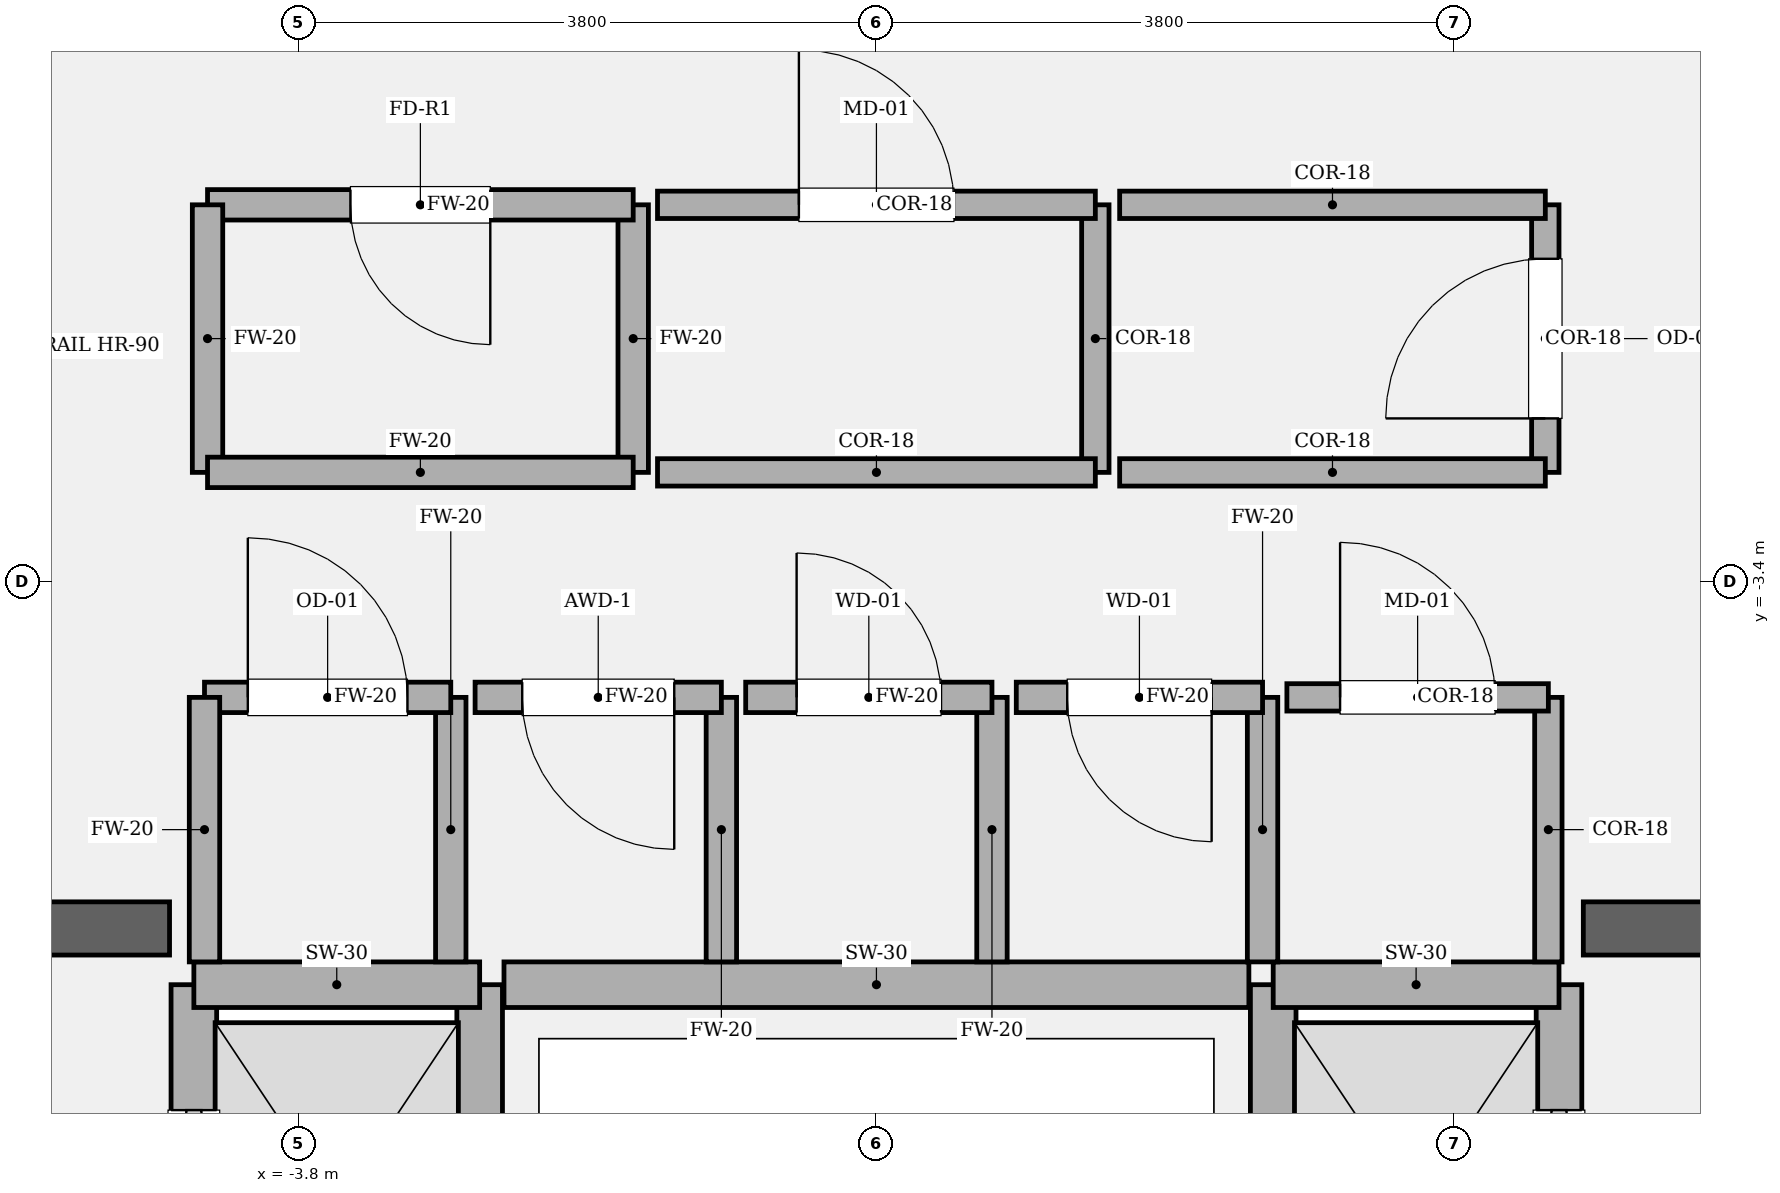
"""IFC4 building model, lengths in metres.
Left out: names, types, materials, properties, quantities, classifications, styles, units other than length and angle.
Written with IfcOpenShell. Run it as: python <this file> out.ifc"""

import sys

from ifc_helpers import new_model, si_unit, direction, frame, frame_2d, origin, place, context, subcontext, project, spatial, rectangle, extrude, element, fill, save


model = new_model("IFC4")
c1 = context("Model", 3, precision=1e-05, world=origin(), true_north=direction((0.0, 1.0)))
c2 = subcontext(c1, "Body", "Model", "MODEL_VIEW")
j1 = project(units=[si_unit("LENGTHUNIT", "METRE"), si_unit("PLANEANGLEUNIT", "RADIAN")], contexts=[c1])
p1 = place(None, origin())
s1 = spatial("IfcSite", under=j1, at=p1, CompositionType="ELEMENT")
p2 = place(p1, origin())
s2 = spatial("IfcBuilding", under=s1, at=p2, CompositionType="ELEMENT")
p3 = place(p2, frame((0.0, 0.0, 321.6)))
s3 = spatial("IfcBuildingStorey", under=s2, at=p3, CompositionType="ELEMENT", Elevation=321.6)
p4 = place(p3, frame((-9.975, -5.68, 0.0), z_axis=(0.0, 0.0, 1.0), x_axis=(1.0, 0.0, 0.0)))
e1 = element("IfcWall", 1, at=p4, inside=s3, PredefinedType="SOLIDWALL", context=c2, shape_type="SweptSolid", body=[
    extrude(rectangle(XDim=5.325, YDim=0.35, at=frame_2d((2.663, 0.0))), origin(), (0.0, 0.0, 1.0), 4.2),
])
p5 = place(p4, frame((1.435, 0.0, 0.0)))
e2 = element("IfcOpeningElement", 2, at=p5, cuts=e1, PredefinedType="OPENING", context=c2, shape_type="SweptSolid", body=[
    extrude(rectangle(XDim=1.18, YDim=2.2, at=frame_2d((0.59, 1.1))), frame((0.0, 0.185, 0.0), z_axis=(0.0, -1.0, 0.0), x_axis=(1.0, 0.0, 0.0)), (0.0, 0.0, 1.0), 0.37),
])
p6 = place(p3, frame((4.65, -5.68, 0.0), z_axis=(0.0, 0.0, 1.0), x_axis=(1.0, 0.0, 0.0)))
e3 = element("IfcWall", 3, at=p6, inside=s3, PredefinedType="SOLIDWALL", context=c2, shape_type="SweptSolid", body=[
    extrude(rectangle(XDim=5.325, YDim=0.35, at=frame_2d((2.663, 0.0))), origin(), (0.0, 0.0, 1.0), 4.2),
])
p7 = place(p6, frame((2.71, 0.0, 0.0)))
e4 = element("IfcOpeningElement", 4, at=p7, cuts=e3, PredefinedType="OPENING", context=c2, shape_type="SweptSolid", body=[
    extrude(rectangle(XDim=1.18, YDim=2.2, at=frame_2d((0.59, 1.1))), frame((0.0, 0.185, 0.0), z_axis=(0.0, -1.0, 0.0), x_axis=(1.0, 0.0, 0.0)), (0.0, 0.0, 1.0), 0.37),
])
p8 = place(p3, frame((-4.49, -8.82, 0.0), z_axis=(0.0, 0.0, 1.0), x_axis=(0.0, 1.0, 0.0)))
e5 = element("IfcWall", 5, at=p8, inside=s3, PredefinedType="SOLIDWALL", context=c2, shape_type="SweptSolid", body=[
    extrude(rectangle(XDim=2.77, YDim=0.3, at=frame_2d((1.385, 0.0))), origin(), (0.0, 0.0, 1.0), 4.0),
])
p9 = place(p8, frame((0.825, 0.0, 0.0)))
e6 = element("IfcOpeningElement", 6, at=p9, cuts=e5, PredefinedType="OPENING", context=c2, shape_type="SweptSolid", body=[
    extrude(rectangle(XDim=1.12, YDim=2.25, at=frame_2d((0.56, 1.125))), frame((0.0, 0.16, 0.0), z_axis=(0.0, -1.0, 0.0), x_axis=(1.0, 0.0, 0.0)), (0.0, 0.0, 1.0), 0.32),
])
p10 = place(p3, frame((-2.61, -8.82, 0.0), z_axis=(0.0, 0.0, 1.0), x_axis=(0.0, 1.0, 0.0)))
e7 = element("IfcWall", 7, at=p10, inside=s3, PredefinedType="SOLIDWALL", context=c2, shape_type="SweptSolid", body=[
    extrude(rectangle(XDim=2.77, YDim=0.3, at=frame_2d((1.385, 0.0))), origin(), (0.0, 0.0, 1.0), 4.0),
])
p11 = place(p3, frame((-4.49, -6.05, 0.0), z_axis=(0.0, 0.0, 1.0), x_axis=(1.0, 0.0, 0.0)))
e8 = element("IfcWall", 8, at=p11, inside=s3, PredefinedType="SOLIDWALL", context=c2, shape_type="SweptSolid", body=[
    extrude(rectangle(XDim=1.88, YDim=0.3, at=frame_2d((0.94, 0.0))), origin(), (0.0, 0.0, 1.0), 4.0),
])
p12 = place(p3, frame((4.49, -8.82, 0.0), z_axis=(0.0, 0.0, 1.0), x_axis=(0.0, 1.0, 0.0)))
e9 = element("IfcWall", 9, at=p12, inside=s3, PredefinedType="SOLIDWALL", context=c2, shape_type="SweptSolid", body=[
    extrude(rectangle(XDim=2.77, YDim=0.3, at=frame_2d((1.385, 0.0))), origin(), (0.0, 0.0, 1.0), 4.0),
])
p13 = place(p12, frame((0.825, 0.0, 0.0)))
e10 = element("IfcOpeningElement", 10, at=p13, cuts=e9, PredefinedType="OPENING", context=c2, shape_type="SweptSolid", body=[
    extrude(rectangle(XDim=1.12, YDim=2.25, at=frame_2d((0.56, 1.125))), frame((0.0, 0.16, 0.0), z_axis=(0.0, -1.0, 0.0), x_axis=(1.0, 0.0, 0.0)), (0.0, 0.0, 1.0), 0.32),
])
p14 = place(p3, frame((2.61, -8.82, 0.0), z_axis=(0.0, 0.0, 1.0), x_axis=(0.0, 1.0, 0.0)))
e11 = element("IfcWall", 11, at=p14, inside=s3, PredefinedType="SOLIDWALL", context=c2, shape_type="SweptSolid", body=[
    extrude(rectangle(XDim=2.77, YDim=0.3, at=frame_2d((1.385, 0.0))), origin(), (0.0, 0.0, 1.0), 4.0),
])
p15 = place(p3, frame((2.61, -6.05, 0.0), z_axis=(0.0, 0.0, 1.0), x_axis=(1.0, 0.0, 0.0)))
e12 = element("IfcWall", 12, at=p15, inside=s3, PredefinedType="SOLIDWALL", context=c2, shape_type="SweptSolid", body=[
    extrude(rectangle(XDim=1.88, YDim=0.3, at=frame_2d((0.94, 0.0))), origin(), (0.0, 0.0, 1.0), 4.0),
])
p16 = place(p3, frame((-2.45, -6.05, 0.0), z_axis=(0.0, 0.0, 1.0), x_axis=(1.0, 0.0, 0.0)))
e13 = element("IfcWall", 13, at=p16, inside=s3, PredefinedType="SOLIDWALL", context=c2, shape_type="SweptSolid", body=[
    extrude(rectangle(XDim=4.9, YDim=0.3, at=frame_2d((2.45, 0.0))), origin(), (0.0, 0.0, 1.0), 4.0),
])
p17 = place(p3, frame((-2.8, -5.9, 0.0), z_axis=(0.0, 0.0, 1.0), x_axis=(0.0, 1.0, 0.0)))
e14 = element("IfcWall", 14, at=p17, inside=s3, PredefinedType="SOLIDWALL", context=c2, shape_type="SweptSolid", body=[
    extrude(rectangle(XDim=1.74, YDim=0.2, at=frame_2d((0.87, 0.0))), origin(), (0.0, 0.0, 1.0), 4.0),
])
p18 = place(p3, frame((-2.8, -4.16, 0.0), z_axis=(0.0, 0.0, 1.0), x_axis=(-1.0, 0.0, 0.0)))
e15 = element("IfcWall", 15, at=p18, inside=s3, PredefinedType="SOLIDWALL", context=c2, shape_type="SweptSolid", body=[
    extrude(rectangle(XDim=1.62, YDim=0.2, at=frame_2d((0.81, 0.0))), origin(), (0.0, 0.0, 1.0), 4.0),
])
p19 = place(p18, frame((0.285, 0.0, 0.0)))
e16 = element("IfcOpeningElement", 16, at=p19, cuts=e15, PredefinedType="OPENING", context=c2, shape_type="SweptSolid", body=[
    extrude(rectangle(XDim=1.05, YDim=2.2, at=frame_2d((0.525, 1.1))), frame((0.0, 0.11, 0.0), z_axis=(0.0, -1.0, 0.0), x_axis=(1.0, 0.0, 0.0)), (0.0, 0.0, 1.0), 0.22),
])
for number, where, z_axis, x_axis in (
    (17, (-4.42, -4.16, 0.0), (0.0, 0.0, 1.0), (0.0, -1.0, 0.0)),
    (18, (-1.02, -5.9, 0.0), (0.0, 0.0, 1.0), (0.0, 1.0, 0.0)),
):
    element("IfcWall", number, at=place(p3, frame(where, z_axis=z_axis, x_axis=x_axis)), inside=s3, PredefinedType="SOLIDWALL", context=c2, shape_type="SweptSolid", body=[
        extrude(rectangle(XDim=1.74, YDim=0.2, at=frame_2d((0.87, 0.0))), origin(), (0.0, 0.0, 1.0), 4.0),
    ])
p20 = place(p3, frame((-1.02, -4.16, 0.0), z_axis=(0.0, 0.0, 1.0), x_axis=(-1.0, 0.0, 0.0)))
e19 = element("IfcWall", 19, at=p20, inside=s3, PredefinedType="SOLIDWALL", context=c2, shape_type="SweptSolid", body=[
    extrude(rectangle(XDim=1.62, YDim=0.2, at=frame_2d((0.81, 0.0))), origin(), (0.0, 0.0, 1.0), 4.0),
])
p21 = place(p20, frame((0.31, 0.0, 0.0)))
e20 = element("IfcOpeningElement", 20, at=p21, cuts=e19, PredefinedType="OPENING", context=c2, shape_type="SweptSolid", body=[
    extrude(rectangle(XDim=1.0, YDim=2.15, at=frame_2d((0.5, 1.075))), frame((0.0, 0.11, 0.0), z_axis=(0.0, -1.0, 0.0), x_axis=(1.0, 0.0, 0.0)), (0.0, 0.0, 1.0), 0.22),
])
p22 = place(p3, frame((0.76, -5.9, 0.0), z_axis=(0.0, 0.0, 1.0), x_axis=(0.0, 1.0, 0.0)))
e21 = element("IfcWall", 21, at=p22, inside=s3, PredefinedType="SOLIDWALL", context=c2, shape_type="SweptSolid", body=[
    extrude(rectangle(XDim=1.74, YDim=0.2, at=frame_2d((0.87, 0.0))), origin(), (0.0, 0.0, 1.0), 4.0),
])
p23 = place(p3, frame((0.76, -4.16, 0.0), z_axis=(0.0, 0.0, 1.0), x_axis=(-1.0, 0.0, 0.0)))
e22 = element("IfcWall", 22, at=p23, inside=s3, PredefinedType="SOLIDWALL", context=c2, shape_type="SweptSolid", body=[
    extrude(rectangle(XDim=1.62, YDim=0.2, at=frame_2d((0.81, 0.0))), origin(), (0.0, 0.0, 1.0), 4.0),
])
p24 = place(p23, frame((0.335, 0.0, 0.0)))
e23 = element("IfcOpeningElement", 23, at=p24, cuts=e22, PredefinedType="OPENING", context=c2, shape_type="SweptSolid", body=[
    extrude(rectangle(XDim=0.95, YDim=2.15, at=frame_2d((0.475, 1.075))), frame((0.0, 0.11, 0.0), z_axis=(0.0, -1.0, 0.0), x_axis=(1.0, 0.0, 0.0)), (0.0, 0.0, 1.0), 0.22),
])
p25 = place(p3, frame((2.54, -5.9, 0.0), z_axis=(0.0, 0.0, 1.0), x_axis=(0.0, 1.0, 0.0)))
e24 = element("IfcWall", 24, at=p25, inside=s3, PredefinedType="SOLIDWALL", context=c2, shape_type="SweptSolid", body=[
    extrude(rectangle(XDim=1.74, YDim=0.2, at=frame_2d((0.87, 0.0))), origin(), (0.0, 0.0, 1.0), 4.0),
])
p26 = place(p3, frame((2.54, -4.16, 0.0), z_axis=(0.0, 0.0, 1.0), x_axis=(-1.0, 0.0, 0.0)))
e25 = element("IfcWall", 25, at=p26, inside=s3, PredefinedType="SOLIDWALL", context=c2, shape_type="SweptSolid", body=[
    extrude(rectangle(XDim=1.62, YDim=0.2, at=frame_2d((0.81, 0.0))), origin(), (0.0, 0.0, 1.0), 4.0),
])
p27 = place(p26, frame((0.335, 0.0, 0.0)))
e26 = element("IfcOpeningElement", 26, at=p27, cuts=e25, PredefinedType="OPENING", context=c2, shape_type="SweptSolid", body=[
    extrude(rectangle(XDim=0.95, YDim=2.15, at=frame_2d((0.475, 1.075))), frame((0.0, 0.11, 0.0), z_axis=(0.0, -1.0, 0.0), x_axis=(1.0, 0.0, 0.0)), (0.0, 0.0, 1.0), 0.22),
])
p28 = place(p3, frame((4.42, -5.9, 0.0), z_axis=(0.0, 0.0, 1.0), x_axis=(0.0, 1.0, 0.0)))
e27 = element("IfcWall", 27, at=p28, inside=s3, PredefinedType="PARTITIONING", context=c2, shape_type="SweptSolid", body=[
    extrude(rectangle(XDim=1.74, YDim=0.18, at=frame_2d((0.87, 0.0))), origin(), (0.0, 0.0, 1.0), 4.0),
])
p29 = place(p3, frame((4.42, -4.16, 0.0), z_axis=(0.0, 0.0, 1.0), x_axis=(-1.0, 0.0, 0.0)))
e28 = element("IfcWall", 28, at=p29, inside=s3, PredefinedType="PARTITIONING", context=c2, shape_type="SweptSolid", body=[
    extrude(rectangle(XDim=1.72, YDim=0.18, at=frame_2d((0.86, 0.0))), origin(), (0.0, 0.0, 1.0), 4.0),
])
p30 = place(p29, frame((0.35, 0.0, 0.0)))
e29 = element("IfcOpeningElement", 29, at=p30, cuts=e28, PredefinedType="OPENING", context=c2, shape_type="SweptSolid", body=[
    extrude(rectangle(XDim=1.02, YDim=2.2, at=frame_2d((0.51, 1.1))), frame((0.0, 0.1, 0.0), z_axis=(0.0, -1.0, 0.0), x_axis=(1.0, 0.0, 0.0)), (0.0, 0.0, 1.0), 0.2),
])
p31 = place(p3, frame((-1.6, -2.68, 0.0), z_axis=(0.0, 0.0, 1.0), x_axis=(0.0, 1.0, 0.0)))
e30 = element("IfcWall", 30, at=p31, inside=s3, PredefinedType="SOLIDWALL", context=c2, shape_type="SweptSolid", body=[
    extrude(rectangle(XDim=1.76, YDim=0.2, at=frame_2d((0.88, 0.0))), origin(), (0.0, 0.0, 1.0), 4.0),
])
p32 = place(p3, frame((-1.6, -0.92, 0.0), z_axis=(0.0, 0.0, 1.0), x_axis=(-1.0, 0.0, 0.0)))
e31 = element("IfcWall", 31, at=p32, inside=s3, PredefinedType="SOLIDWALL", context=c2, shape_type="SweptSolid", body=[
    extrude(rectangle(XDim=2.8, YDim=0.2, at=frame_2d((1.4, 0.0))), origin(), (0.0, 0.0, 1.0), 4.0),
])
p33 = place(p32, frame((0.94, 0.0, 0.0)))
e32 = element("IfcOpeningElement", 32, at=p33, cuts=e31, PredefinedType="OPENING", context=c2, shape_type="SweptSolid", body=[
    extrude(rectangle(XDim=0.92, YDim=2.1, at=frame_2d((0.46, 1.05))), frame((0.0, 0.11, 0.0), z_axis=(0.0, -1.0, 0.0), x_axis=(1.0, 0.0, 0.0)), (0.0, 0.0, 1.0), 0.22),
])
p34 = place(p3, frame((-4.4, -0.92, 0.0), z_axis=(0.0, 0.0, 1.0), x_axis=(0.0, -1.0, 0.0)))
e33 = element("IfcWall", 33, at=p34, inside=s3, PredefinedType="SOLIDWALL", context=c2, shape_type="SweptSolid", body=[
    extrude(rectangle(XDim=1.76, YDim=0.2, at=frame_2d((0.88, 0.0))), origin(), (0.0, 0.0, 1.0), 4.0),
])
p35 = place(p3, frame((-4.4, -2.68, 0.0), z_axis=(0.0, 0.0, 1.0), x_axis=(1.0, 0.0, 0.0)))
e34 = element("IfcWall", 34, at=p35, inside=s3, PredefinedType="SOLIDWALL", context=c2, shape_type="SweptSolid", body=[
    extrude(rectangle(XDim=2.8, YDim=0.2, at=frame_2d((1.4, 0.0))), origin(), (0.0, 0.0, 1.0), 4.0),
])
p36 = place(p3, frame((1.44, -2.68, 0.0), z_axis=(0.0, 0.0, 1.0), x_axis=(0.0, 1.0, 0.0)))
e35 = element("IfcWall", 35, at=p36, inside=s3, PredefinedType="PARTITIONING", context=c2, shape_type="SweptSolid", body=[
    extrude(rectangle(XDim=1.76, YDim=0.18, at=frame_2d((0.88, 0.0))), origin(), (0.0, 0.0, 1.0), 4.0),
])
p37 = place(p3, frame((1.44, -0.92, 0.0), z_axis=(0.0, 0.0, 1.0), x_axis=(-1.0, 0.0, 0.0)))
e36 = element("IfcWall", 36, at=p37, inside=s3, PredefinedType="PARTITIONING", context=c2, shape_type="SweptSolid", body=[
    extrude(rectangle(XDim=2.88, YDim=0.18, at=frame_2d((1.44, 0.0))), origin(), (0.0, 0.0, 1.0), 4.0),
])
p38 = place(p37, frame((0.93, 0.0, 0.0)))
e37 = element("IfcOpeningElement", 37, at=p38, cuts=e36, PredefinedType="OPENING", context=c2, shape_type="SweptSolid", body=[
    extrude(rectangle(XDim=1.02, YDim=2.2, at=frame_2d((0.51, 1.1))), frame((0.0, 0.1, 0.0), z_axis=(0.0, -1.0, 0.0), x_axis=(1.0, 0.0, 0.0)), (0.0, 0.0, 1.0), 0.2),
])
p39 = place(p3, frame((-1.44, -2.68, 0.0), z_axis=(0.0, 0.0, 1.0), x_axis=(1.0, 0.0, 0.0)))
e38 = element("IfcWall", 38, at=p39, inside=s3, PredefinedType="PARTITIONING", context=c2, shape_type="SweptSolid", body=[
    extrude(rectangle(XDim=2.88, YDim=0.18, at=frame_2d((1.44, 0.0))), origin(), (0.0, 0.0, 1.0), 4.0),
])
p40 = place(p3, frame((4.4, -2.68, 0.0), z_axis=(0.0, 0.0, 1.0), x_axis=(0.0, 1.0, 0.0)))
e39 = element("IfcWall", 39, at=p40, inside=s3, PredefinedType="PARTITIONING", context=c2, shape_type="SweptSolid", body=[
    extrude(rectangle(XDim=1.76, YDim=0.18, at=frame_2d((0.88, 0.0))), origin(), (0.0, 0.0, 1.0), 4.0),
])
p41 = place(p40, frame((0.355, 0.0, 0.0)))
e40 = element("IfcOpeningElement", 40, at=p41, cuts=e39, PredefinedType="OPENING", context=c2, shape_type="SweptSolid", body=[
    extrude(rectangle(XDim=1.05, YDim=2.2, at=frame_2d((0.525, 1.1))), frame((0.0, 0.1, 0.0), z_axis=(0.0, -1.0, 0.0), x_axis=(1.0, 0.0, 0.0)), (0.0, 0.0, 1.0), 0.2),
])
for number, where, z_axis, x_axis in (
    (41, (4.4, -0.92, 0.0), (0.0, 0.0, 1.0), (-1.0, 0.0, 0.0)),
    (42, (1.6, -2.68, 0.0), (0.0, 0.0, 1.0), (1.0, 0.0, 0.0)),
):
    element("IfcWall", number, at=place(p3, frame(where, z_axis=z_axis, x_axis=x_axis)), inside=s3, PredefinedType="PARTITIONING", context=c2, shape_type="SweptSolid", body=[
        extrude(rectangle(XDim=2.8, YDim=0.18, at=frame_2d((1.4, 0.0))), origin(), (0.0, 0.0, 1.0), 4.0),
    ])
p42 = place(p9, origin())
e43 = element("IfcDoor", 43, at=p42, inside=s3, OperationType="SLIDING_TO_LEFT", PredefinedType="DOOR", context=c2, shape_type="SweptSolid", body=[
    extrude(rectangle(XDim=1.12, YDim=2.25, at=frame_2d((0.56, 1.125))), frame((0.0, 0.025, 0.0), z_axis=(0.0, -1.0, 0.0), x_axis=(1.0, 0.0, 0.0)), (0.0, 0.0, 1.0), 0.05),
])
fill(e6, e43)
p43 = place(p13, origin())
e44 = element("IfcDoor", 44, at=p43, inside=s3, OperationType="SLIDING_TO_RIGHT", PredefinedType="DOOR", context=c2, shape_type="SweptSolid", body=[
    extrude(rectangle(XDim=1.12, YDim=2.25, at=frame_2d((0.56, 1.125))), frame((0.0, 0.025, 0.0), z_axis=(0.0, -1.0, 0.0), x_axis=(1.0, 0.0, 0.0)), (0.0, 0.0, 1.0), 0.05),
])
fill(e10, e44)
p44 = place(p19, origin())
e45 = element("IfcDoor", 45, at=p44, inside=s3, OperationType="SINGLE_SWING_RIGHT", PredefinedType="DOOR", context=c2, shape_type="SweptSolid", body=[
    extrude(rectangle(XDim=1.05, YDim=2.2, at=frame_2d((0.525, 1.1))), frame((0.0, 0.025, 0.0), z_axis=(0.0, -1.0, 0.0), x_axis=(1.0, 0.0, 0.0)), (0.0, 0.0, 1.0), 0.05),
])
fill(e16, e45)
p45 = place(p21, origin())
e46 = element("IfcDoor", 46, at=p45, inside=s3, OperationType="SINGLE_SWING_LEFT", PredefinedType="DOOR", context=c2, shape_type="SweptSolid", body=[
    extrude(rectangle(XDim=1.0, YDim=2.15, at=frame_2d((0.5, 1.075))), frame((0.0, 0.025, 0.0), z_axis=(0.0, -1.0, 0.0), x_axis=(1.0, 0.0, 0.0)), (0.0, 0.0, 1.0), 0.05),
])
fill(e20, e46)
p46 = place(p24, origin())
e47 = element("IfcDoor", 47, at=p46, inside=s3, OperationType="SINGLE_SWING_RIGHT", PredefinedType="DOOR", context=c2, shape_type="SweptSolid", body=[
    extrude(rectangle(XDim=0.95, YDim=2.15, at=frame_2d((0.475, 1.075))), frame((0.0, 0.025, 0.0), z_axis=(0.0, -1.0, 0.0), x_axis=(1.0, 0.0, 0.0)), (0.0, 0.0, 1.0), 0.05),
])
fill(e23, e47)
p47 = place(p27, origin())
e48 = element("IfcDoor", 48, at=p47, inside=s3, OperationType="SINGLE_SWING_LEFT", PredefinedType="DOOR", context=c2, shape_type="SweptSolid", body=[
    extrude(rectangle(XDim=0.95, YDim=2.15, at=frame_2d((0.475, 1.075))), frame((0.0, 0.025, 0.0), z_axis=(0.0, -1.0, 0.0), x_axis=(1.0, 0.0, 0.0)), (0.0, 0.0, 1.0), 0.05),
])
fill(e26, e48)
p48 = place(p30, origin())
e49 = element("IfcDoor", 49, at=p48, inside=s3, OperationType="SINGLE_SWING_RIGHT", PredefinedType="DOOR", context=c2, shape_type="SweptSolid", body=[
    extrude(rectangle(XDim=1.02, YDim=2.2, at=frame_2d((0.51, 1.1))), frame((0.0, 0.025, 0.0), z_axis=(0.0, -1.0, 0.0), x_axis=(1.0, 0.0, 0.0)), (0.0, 0.0, 1.0), 0.05),
])
fill(e29, e49)
p49 = place(p33, origin())
e50 = element("IfcDoor", 50, at=p49, inside=s3, OperationType="SINGLE_SWING_LEFT", PredefinedType="DOOR", context=c2, shape_type="SweptSolid", body=[
    extrude(rectangle(XDim=0.92, YDim=2.1, at=frame_2d((0.46, 1.05))), frame((0.0, 0.025, 0.0), z_axis=(0.0, -1.0, 0.0), x_axis=(1.0, 0.0, 0.0)), (0.0, 0.0, 1.0), 0.05),
])
fill(e32, e50)
p50 = place(p38, origin())
e51 = element("IfcDoor", 51, at=p50, inside=s3, OperationType="SINGLE_SWING_RIGHT", PredefinedType="DOOR", context=c2, shape_type="SweptSolid", body=[
    extrude(rectangle(XDim=1.02, YDim=2.2, at=frame_2d((0.51, 1.1))), frame((0.0, 0.025, 0.0), z_axis=(0.0, -1.0, 0.0), x_axis=(1.0, 0.0, 0.0)), (0.0, 0.0, 1.0), 0.05),
])
fill(e37, e51)
p51 = place(p41, origin())
e52 = element("IfcDoor", 52, at=p51, inside=s3, OperationType="SINGLE_SWING_LEFT", PredefinedType="DOOR", context=c2, shape_type="SweptSolid", body=[
    extrude(rectangle(XDim=1.05, YDim=2.2, at=frame_2d((0.525, 1.1))), frame((0.0, 0.025, 0.0), z_axis=(0.0, -1.0, 0.0), x_axis=(1.0, 0.0, 0.0)), (0.0, 0.0, 1.0), 0.05),
])
fill(e40, e52)
save(model, sys.argv[1])
